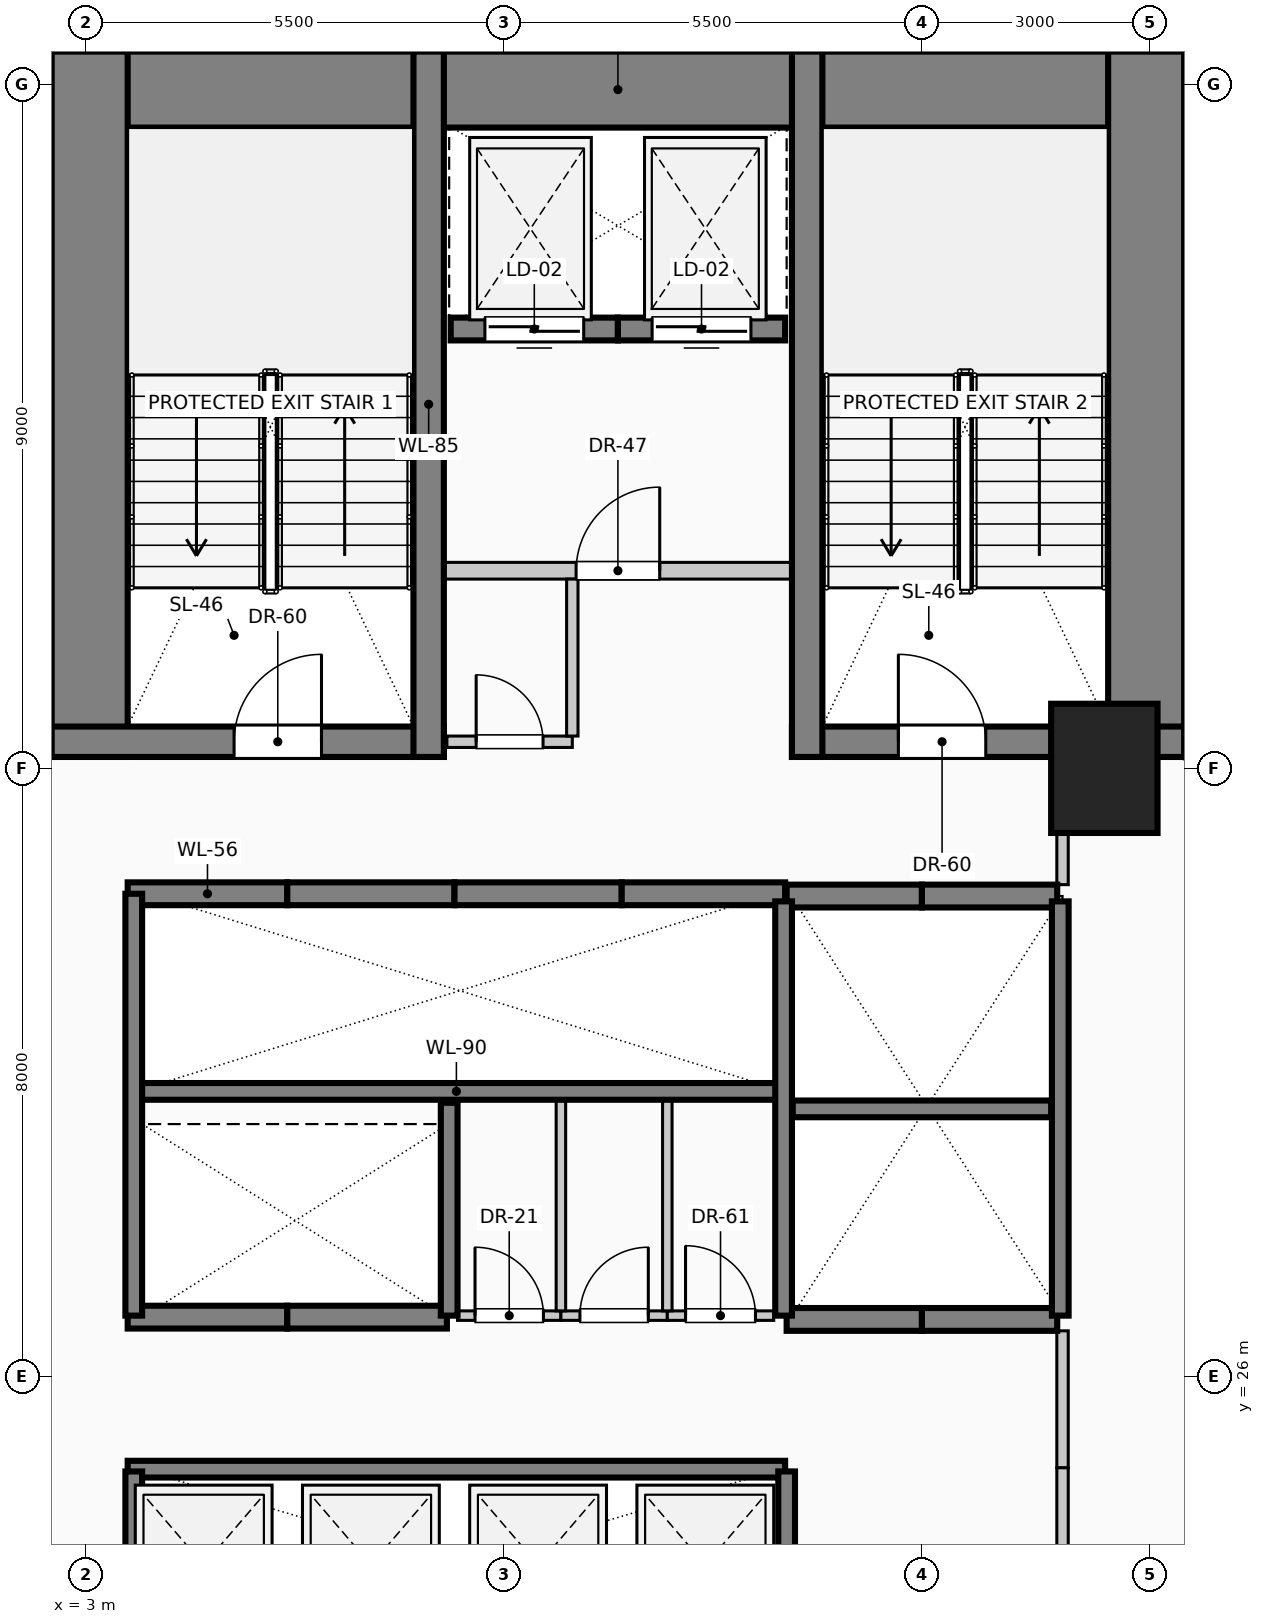
"""IFC4 building model, lengths in metres.
Left out: names, types, materials, properties, quantities, classifications, styles, units other than length and angle.
Written with IfcOpenShell. Run it as: python <this file> out.ifc"""

import sys

from ifc_helpers import new_model, si_unit, direction, frame, frame_2d, origin, origin_2d, place, context, subcontext, project, spatial, rectangle, extrude, element, fill, save


model = new_model("IFC4")
c1 = context("Model", 3, precision=1e-05, world=origin(), true_north=direction((0.0, 1.0)))
c2 = subcontext(c1, "Body", "Model", "MODEL_VIEW")
j1 = project(units=[si_unit("LENGTHUNIT", "METRE"), si_unit("PLANEANGLEUNIT", "RADIAN")], contexts=[c1])
p1 = place(None, origin())
s1 = spatial("IfcSite", under=j1, at=p1, CompositionType="ELEMENT")
p2 = place(p1, origin())
s2 = spatial("IfcBuilding", under=s1, at=p2, CompositionType="ELEMENT")
p3 = place(p2, frame((0.0, 0.0, 13.5)))
s3 = spatial("IfcBuildingStorey", under=s2, at=p3, CompositionType="ELEMENT", Elevation=13.5)
p4 = place(p3, frame((2.55, 42.93, 0.0), z_axis=(0.0, 0.0, 1.0), x_axis=(1.0, 0.0, 0.0)))
e1 = element("IfcWall", 1, at=p4, inside=s3, PredefinedType="SHEAR", context=c2, shape_type="SweptSolid", body=[
    extrude(rectangle(XDim=14.9, YDim=1.0, at=frame_2d((7.45, 0.0))), origin(), (0.0, 0.0, 1.0), 4.05),
])
for number, where, z_axis, x_axis in (
    (2, (3.05, 34.15, 0.0), (0.0, 0.0, 1.0), (0.0, 1.0, 0.0)),
    (3, (16.95, 34.15, 0.0), (0.0, 0.0, 1.0), (0.0, 1.0, 0.0)),
):
    element("IfcWall", number, at=place(p3, frame(where, z_axis=z_axis, x_axis=x_axis)), inside=s3, PredefinedType="SHEAR", context=c2, shape_type="SweptSolid", body=[
        extrude(rectangle(XDim=9.28, YDim=1.0, at=frame_2d((4.64, 0.0))), origin(), (0.0, 0.0, 1.0), 4.05),
    ])
p5 = place(p3, frame((2.55, 34.35, 0.0), z_axis=(0.0, 0.0, 1.0), x_axis=(1.0, 0.0, 0.0)))
e4 = element("IfcWall", 4, at=p5, inside=s3, PredefinedType="SHEAR", context=c2, shape_type="SweptSolid", body=[
    extrude(rectangle(XDim=5.16, YDim=0.4, at=frame_2d((2.58, 0.0))), origin(), (0.0, 0.0, 1.0), 4.05),
])
p6 = place(p5, frame((2.4, 0.0, 0.0)))
e5 = element("IfcOpeningElement", 5, at=p6, cuts=e4, PredefinedType="OPENING", context=c2, shape_type="SweptSolid", body=[
    extrude(rectangle(XDim=1.15, YDim=2.2, at=frame_2d((0.575, 1.1))), frame((0.0, 0.21, 0.0), z_axis=(0.0, -1.0, 0.0), x_axis=(1.0, 0.0, 0.0)), (0.0, 0.0, 1.0), 0.42),
])
p7 = place(p3, frame((12.29, 34.35, 0.0), z_axis=(0.0, 0.0, 1.0), x_axis=(1.0, 0.0, 0.0)))
e6 = element("IfcWall", 6, at=p7, inside=s3, PredefinedType="SHEAR", context=c2, shape_type="SweptSolid", body=[
    extrude(rectangle(XDim=5.16, YDim=0.4, at=frame_2d((2.58, 0.0))), origin(), (0.0, 0.0, 1.0), 4.05),
])
p8 = place(p7, frame((1.4, 0.0, 0.0)))
e7 = element("IfcOpeningElement", 7, at=p8, cuts=e6, PredefinedType="OPENING", context=c2, shape_type="SweptSolid", body=[
    extrude(rectangle(XDim=1.15, YDim=2.2, at=frame_2d((0.575, 1.1))), frame((0.0, 0.21, 0.0), z_axis=(0.0, -1.0, 0.0), x_axis=(1.0, 0.0, 0.0)), (0.0, 0.0, 1.0), 0.42),
])
for number, where, z_axis, x_axis in (
    (8, (7.51, 34.15, 0.0), (0.0, 0.0, 1.0), (0.0, 1.0, 0.0)),
    (9, (12.49, 34.15, 0.0), (0.0, 0.0, 1.0), (0.0, 1.0, 0.0)),
):
    element("IfcWall", number, at=place(p3, frame(where, z_axis=z_axis, x_axis=x_axis)), inside=s3, PredefinedType="SHEAR", context=c2, shape_type="SweptSolid", body=[
        extrude(rectangle(XDim=9.28, YDim=0.4, at=frame_2d((4.64, 0.0))), origin(), (0.0, 0.0, 1.0), 4.05),
    ])
p9 = place(p3, frame((16.4, 34.0, 0.0), z_axis=(0.0, 0.0, 1.0), x_axis=(1.0, 0.0, 0.0)))
e10 = element("IfcColumn", 10, at=p9, inside=s3, PredefinedType="COLUMN", context=c2, shape_type="SweptSolid", body=[
    extrude(rectangle(XDim=1.4, YDim=1.7, at=origin_2d()), origin(), (0.0, 0.0, 1.0), 4.05),
])
for number, where, z_axis, x_axis in (
    (11, (14.0, 26.75, 0.0), (0.0, 0.0, 1.0), (-1.0, 0.0, 0.0)),
    (12, (15.78, 26.75, 0.0), (0.0, 0.0, 1.0), (-1.0, 0.0, 0.0)),
    (13, (12.22, 32.32, 0.0), (0.0, 0.0, 1.0), (1.0, 0.0, 0.0)),
    (14, (14.0, 32.32, 0.0), (0.0, 0.0, 1.0), (1.0, 0.0, 0.0)),
):
    element("IfcWall", number, at=place(p3, frame(where, z_axis=z_axis, x_axis=x_axis)), inside=s3, PredefinedType="SOLIDWALL", context=c2, shape_type="SweptSolid", body=[
        extrude(rectangle(XDim=1.78, YDim=0.3, at=frame_2d((0.89, 0.0))), origin(), (0.0, 0.0, 1.0), 4.05),
    ])
p10 = place(p3, frame((3.55, 32.35, 0.0), z_axis=(0.0, 0.0, 1.0), x_axis=(1.0, 0.0, 0.0)))
e15 = element("IfcWall", 15, at=p10, inside=s3, PredefinedType="SOLIDWALL", context=c2, shape_type="SweptSolid", body=[
    extrude(rectangle(XDim=2.1, YDim=0.3, at=frame_2d((1.05, 0.0))), origin(), (0.0, 0.0, 1.0), 4.05),
])
p11 = place(p3, frame((5.65, 32.35, 0.0), z_axis=(0.0, 0.0, 1.0), x_axis=(1.0, 0.0, 0.0)))
e16 = element("IfcWall", 16, at=p11, inside=s3, PredefinedType="SOLIDWALL", context=c2, shape_type="SweptSolid", body=[
    extrude(rectangle(XDim=2.2, YDim=0.3, at=frame_2d((1.1, 0.0))), origin(), (0.0, 0.0, 1.0), 4.05),
])
p12 = place(p3, frame((7.85, 32.35, 0.0), z_axis=(0.0, 0.0, 1.0), x_axis=(1.0, 0.0, 0.0)))
e17 = element("IfcWall", 17, at=p12, inside=s3, PredefinedType="SOLIDWALL", context=c2, shape_type="SweptSolid", body=[
    extrude(rectangle(XDim=2.2, YDim=0.3, at=frame_2d((1.1, 0.0))), origin(), (0.0, 0.0, 1.0), 4.05),
])
p13 = place(p3, frame((10.05, 32.35, 0.0), z_axis=(0.0, 0.0, 1.0), x_axis=(1.0, 0.0, 0.0)))
e18 = element("IfcWall", 18, at=p13, inside=s3, PredefinedType="SOLIDWALL", context=c2, shape_type="SweptSolid", body=[
    extrude(rectangle(XDim=2.15, YDim=0.3, at=frame_2d((1.075, 0.0))), origin(), (0.0, 0.0, 1.0), 4.05),
])
p14 = place(p3, frame((5.65, 26.78, 0.0), z_axis=(0.0, 0.0, 1.0), x_axis=(-1.0, 0.0, 0.0)))
e19 = element("IfcWall", 19, at=p14, inside=s3, PredefinedType="SOLIDWALL", context=c2, shape_type="SweptSolid", body=[
    extrude(rectangle(XDim=2.1, YDim=0.3, at=frame_2d((1.05, 0.0))), origin(), (0.0, 0.0, 1.0), 4.05),
])
p15 = place(p3, frame((7.75, 26.78, 0.0), z_axis=(0.0, 0.0, 1.0), x_axis=(-1.0, 0.0, 0.0)))
e20 = element("IfcWall", 20, at=p15, inside=s3, PredefinedType="SOLIDWALL", context=c2, shape_type="SweptSolid", body=[
    extrude(rectangle(XDim=2.1, YDim=0.3, at=frame_2d((1.05, 0.0))), origin(), (0.0, 0.0, 1.0), 4.05),
])
p16 = place(p3, frame((10.0, 39.78, 0.0), z_axis=(0.0, 0.0, 1.0), x_axis=(-1.0, 0.0, 0.0)))
e21 = element("IfcWall", 21, at=p16, inside=s3, PredefinedType="SOLIDWALL", context=c2, shape_type="SweptSolid", body=[
    extrude(rectangle(XDim=2.2, YDim=0.3, at=frame_2d((1.1, 0.0))), origin(), (0.0, 0.0, 1.0), 4.05),
])
p17 = place(p16, frame((0.45, 0.0, 0.0)))
e22 = element("IfcOpeningElement", 22, at=p17, cuts=e21, PredefinedType="OPENING", context=c2, shape_type="SweptSolid", body=[
    extrude(rectangle(XDim=1.3, YDim=2.25, at=frame_2d((0.65, 1.125))), frame((0.0, 0.16, 0.0), z_axis=(0.0, -1.0, 0.0), x_axis=(1.0, 0.0, 0.0)), (0.0, 0.0, 1.0), 0.32),
])
p18 = place(p3, frame((12.2, 39.78, 0.0), z_axis=(0.0, 0.0, 1.0), x_axis=(-1.0, 0.0, 0.0)))
e23 = element("IfcWall", 23, at=p18, inside=s3, PredefinedType="SOLIDWALL", context=c2, shape_type="SweptSolid", body=[
    extrude(rectangle(XDim=2.2, YDim=0.3, at=frame_2d((1.1, 0.0))), origin(), (0.0, 0.0, 1.0), 4.05),
])
p19 = place(p18, frame((0.45, 0.0, 0.0)))
e24 = element("IfcOpeningElement", 24, at=p19, cuts=e23, PredefinedType="OPENING", context=c2, shape_type="SweptSolid", body=[
    extrude(rectangle(XDim=1.3, YDim=2.25, at=frame_2d((0.65, 1.125))), frame((0.0, 0.16, 0.0), z_axis=(0.0, -1.0, 0.0), x_axis=(1.0, 0.0, 0.0)), (0.0, 0.0, 1.0), 0.32),
])
p20 = place(p3, frame((3.55, 29.75, 0.0), z_axis=(0.0, 0.0, 1.0), x_axis=(1.0, 0.0, 0.0)))
e25 = element("IfcWall", 25, at=p20, inside=s3, PredefinedType="SOLIDWALL", context=c2, shape_type="SweptSolid", body=[
    extrude(rectangle(XDim=8.65, YDim=0.22, at=frame_2d((4.325, 0.0))), origin(), (0.0, 0.0, 1.0), 4.05),
])
p21 = place(p3, frame((3.63, 26.8, 0.0), z_axis=(0.0, 0.0, 1.0), x_axis=(0.0, 1.0, 0.0)))
e26 = element("IfcWall", 26, at=p21, inside=s3, PredefinedType="SOLIDWALL", context=c2, shape_type="SweptSolid", body=[
    extrude(rectangle(XDim=5.55, YDim=0.22, at=frame_2d((2.775, 0.0))), origin(), (0.0, 0.0, 1.0), 4.05),
])
p22 = place(p3, frame((7.78, 26.8, 0.0), z_axis=(0.0, 0.0, 1.0), x_axis=(0.0, 1.0, 0.0)))
e27 = element("IfcWall", 27, at=p22, inside=s3, PredefinedType="SOLIDWALL", context=c2, shape_type="SweptSolid", body=[
    extrude(rectangle(XDim=2.8, YDim=0.22, at=frame_2d((1.4, 0.0))), origin(), (0.0, 0.0, 1.0), 4.05),
])
for number, where, z_axis, x_axis in (
    (28, (12.18, 26.8, 0.0), (0.0, 0.0, 1.0), (0.0, 1.0, 0.0)),
    (29, (15.82, 26.8, 0.0), (0.0, 0.0, 1.0), (0.0, 1.0, 0.0)),
):
    element("IfcWall", number, at=place(p3, frame(where, z_axis=z_axis, x_axis=x_axis)), inside=s3, PredefinedType="SOLIDWALL", context=c2, shape_type="SweptSolid", body=[
        extrude(rectangle(XDim=5.45, YDim=0.22, at=frame_2d((2.725, 0.0))), origin(), (0.0, 0.0, 1.0), 4.05),
    ])
p23 = place(p3, frame((12.3, 29.52, 0.0), z_axis=(0.0, 0.0, 1.0), x_axis=(1.0, 0.0, 0.0)))
e30 = element("IfcWall", 30, at=p23, inside=s3, PredefinedType="SOLIDWALL", context=c2, shape_type="SweptSolid", body=[
    extrude(rectangle(XDim=3.4, YDim=0.22, at=frame_2d((1.7, 0.0))), origin(), (0.0, 0.0, 1.0), 4.05),
])
p24 = place(p3, frame((3.55, 24.78, 0.0), z_axis=(0.0, 0.0, 1.0), x_axis=(1.0, 0.0, 0.0)))
e31 = element("IfcWall", 31, at=p24, inside=s3, PredefinedType="SOLIDWALL", context=c2, shape_type="SweptSolid", body=[
    extrude(rectangle(XDim=8.65, YDim=0.22, at=frame_2d((4.325, 0.0))), origin(), (0.0, 0.0, 1.0), 4.05),
])
for number, where, z_axis, x_axis in (
    (32, (3.63, 22.3, 0.0), (0.0, 0.0, 1.0), (0.0, 1.0, 0.0)),
    (33, (12.22, 22.3, 0.0), (0.0, 0.0, 1.0), (0.0, 1.0, 0.0)),
):
    element("IfcWall", number, at=place(p3, frame(where, z_axis=z_axis, x_axis=x_axis)), inside=s3, PredefinedType="SOLIDWALL", context=c2, shape_type="SweptSolid", body=[
        extrude(rectangle(XDim=2.45, YDim=0.22, at=frame_2d((1.225, 0.0))), origin(), (0.0, 0.0, 1.0), 4.05),
    ])
p25 = place(p3, frame((7.51, 36.6, 0.0), z_axis=(0.0, 0.0, 1.0), x_axis=(1.0, 0.0, 0.0)))
e34 = element("IfcWall", 34, at=p25, inside=s3, PredefinedType="PARTITIONING", context=c2, shape_type="SweptSolid", body=[
    extrude(rectangle(XDim=4.98, YDim=0.22, at=frame_2d((2.49, 0.0))), origin(), (0.0, 0.0, 1.0), 3.65),
])
p26 = place(p25, frame((1.94, 0.0, 0.0)))
e35 = element("IfcOpeningElement", 35, at=p26, cuts=e34, PredefinedType="OPENING", context=c2, shape_type="SweptSolid", body=[
    extrude(rectangle(XDim=1.1, YDim=2.2, at=frame_2d((0.55, 1.1))), frame((0.0, 0.12, 0.0), z_axis=(0.0, -1.0, 0.0), x_axis=(1.0, 0.0, 0.0)), (0.0, 0.0, 1.0), 0.24),
])
p27 = place(p3, frame((7.89, 26.8, 0.0), z_axis=(0.0, 0.0, 1.0), x_axis=(1.0, 0.0, 0.0)))
e36 = element("IfcWall", 36, at=p27, inside=s3, PredefinedType="PARTITIONING", context=c2, shape_type="SweptSolid", body=[
    extrude(rectangle(XDim=1.36, YDim=0.125, at=frame_2d((0.68, 0.0))), origin(), (0.0, 0.0, 1.0), 3.65),
])
p28 = place(p27, frame((0.23, 0.0, 0.0)))
e37 = element("IfcOpeningElement", 37, at=p28, cuts=e36, PredefinedType="OPENING", context=c2, shape_type="SweptSolid", body=[
    extrude(rectangle(XDim=0.9, YDim=2.1, at=frame_2d((0.45, 1.05))), frame((0.0, 0.073, 0.0), z_axis=(0.0, -1.0, 0.0), x_axis=(1.0, 0.0, 0.0)), (0.0, 0.0, 1.0), 0.145),
])
p29 = place(p3, frame((9.25, 26.8, 0.0), z_axis=(0.0, 0.0, 1.0), x_axis=(1.0, 0.0, 0.0)))
e38 = element("IfcWall", 38, at=p29, inside=s3, PredefinedType="PARTITIONING", context=c2, shape_type="SweptSolid", body=[
    extrude(rectangle(XDim=1.4, YDim=0.125, at=frame_2d((0.7, 0.0))), origin(), (0.0, 0.0, 1.0), 3.65),
])
p30 = place(p29, frame((0.25, 0.0, 0.0)))
e39 = element("IfcOpeningElement", 39, at=p30, cuts=e38, PredefinedType="OPENING", context=c2, shape_type="SweptSolid", body=[
    extrude(rectangle(XDim=0.9, YDim=2.1, at=frame_2d((0.45, 1.05))), frame((0.0, 0.073, 0.0), z_axis=(0.0, -1.0, 0.0), x_axis=(1.0, 0.0, 0.0)), (0.0, 0.0, 1.0), 0.145),
])
p31 = place(p3, frame((10.65, 26.8, 0.0), z_axis=(0.0, 0.0, 1.0), x_axis=(1.0, 0.0, 0.0)))
e40 = element("IfcWall", 40, at=p31, inside=s3, PredefinedType="PARTITIONING", context=c2, shape_type="SweptSolid", body=[
    extrude(rectangle(XDim=1.4, YDim=0.125, at=frame_2d((0.7, 0.0))), origin(), (0.0, 0.0, 1.0), 3.65),
])
p32 = place(p31, frame((0.24, 0.0, 0.0)))
e41 = element("IfcOpeningElement", 41, at=p32, cuts=e40, PredefinedType="OPENING", context=c2, shape_type="SweptSolid", body=[
    extrude(rectangle(XDim=0.92, YDim=2.1, at=frame_2d((0.46, 1.05))), frame((0.0, 0.073, 0.0), z_axis=(0.0, -1.0, 0.0), x_axis=(1.0, 0.0, 0.0)), (0.0, 0.0, 1.0), 0.145),
])
p33 = place(p3, frame((7.75, 34.35, 0.0), z_axis=(0.0, 0.0, 1.0), x_axis=(1.0, 0.0, 0.0)))
e42 = element("IfcWall", 42, at=p33, inside=s3, PredefinedType="PARTITIONING", context=c2, shape_type="SweptSolid", body=[
    extrude(rectangle(XDim=1.65, YDim=0.15, at=frame_2d((0.825, 0.0))), origin(), (0.0, 0.0, 1.0), 2.695),
])
p34 = place(p33, frame((0.385, 0.0, 0.0)))
e43 = element("IfcOpeningElement", 43, at=p34, cuts=e42, PredefinedType="OPENING", context=c2, shape_type="SweptSolid", body=[
    extrude(rectangle(XDim=0.88, YDim=2.1, at=frame_2d((0.44, 1.05))), frame((0.0, 0.085, 0.0), z_axis=(0.0, -1.0, 0.0), x_axis=(1.0, 0.0, 0.0)), (0.0, 0.0, 1.0), 0.17),
])
p35 = place(p3, frame((9.25, 26.863, 0.0), z_axis=(0.0, 0.0, 1.0), x_axis=(0.0, 1.0, 0.0)))
e44 = element("IfcWall", 44, at=p35, inside=s3, PredefinedType="PARTITIONING", context=c2, shape_type="SweptSolid", body=[
    extrude(rectangle(XDim=2.777, YDim=0.125, at=frame_2d((1.389, 0.0))), origin(), (0.0, 0.0, 1.0), 3.65),
])
p36 = place(p3, frame((9.4, 34.425, 0.0), z_axis=(0.0, 0.0, 1.0), x_axis=(0.0, 1.0, 0.0)))
e45 = element("IfcWall", 45, at=p36, inside=s3, PredefinedType="PARTITIONING", context=c2, shape_type="SweptSolid", body=[
    extrude(rectangle(XDim=2.065, YDim=0.15, at=frame_2d((1.032, 0.0))), origin(), (0.0, 0.0, 1.0), 3.65),
])
p37 = place(p3, frame((10.65, 26.863, 0.0), z_axis=(0.0, 0.0, 1.0), x_axis=(0.0, 1.0, 0.0)))
e46 = element("IfcWall", 46, at=p37, inside=s3, PredefinedType="PARTITIONING", context=c2, shape_type="SweptSolid", body=[
    extrude(rectangle(XDim=2.777, YDim=0.125, at=frame_2d((1.389, 0.0))), origin(), (0.0, 0.0, 1.0), 3.65),
])
p38 = place(p3, frame((15.85, 20.29, 0.0), z_axis=(0.0, 0.0, 1.0), x_axis=(0.0, 1.0, 0.0)))
e47 = element("IfcWall", 47, at=p38, inside=s3, PredefinedType="PARTITIONING", context=c2, shape_type="SweptSolid", body=[
    extrude(rectangle(XDim=4.51, YDim=0.15, at=frame_2d((2.255, 0.0))), origin(), (0.0, 0.0, 1.0), 3.65),
])
p39 = place(p3, frame((15.85, 24.8, 0.0), z_axis=(0.0, 0.0, 1.0), x_axis=(0.0, 1.0, 0.0)))
e48 = element("IfcWall", 48, at=p39, inside=s3, PredefinedType="PARTITIONING", context=c2, shape_type="SweptSolid", body=[
    extrude(rectangle(XDim=1.8, YDim=0.15, at=frame_2d((0.9, 0.0))), origin(), (0.0, 0.0, 1.0), 3.65),
])
p40 = place(p3, frame((15.85, 32.47, 0.0), z_axis=(0.0, 0.0, 1.0), x_axis=(0.0, 1.0, 0.0)))
e49 = element("IfcWall", 49, at=p40, inside=s3, PredefinedType="PARTITIONING", context=c2, shape_type="SweptSolid", body=[
    extrude(rectangle(XDim=0.68, YDim=0.15, at=frame_2d((0.34, 0.0))), origin(), (0.0, 0.0, 1.0), 3.65),
])
p41 = place(p17, origin())
e50 = element("IfcDoor", 50, at=p41, inside=s3, OperationType="SLIDING_TO_LEFT", PredefinedType="DOOR", context=c2, shape_type="SweptSolid", body=[
    extrude(rectangle(XDim=1.3, YDim=2.25, at=frame_2d((0.65, 1.125))), frame((0.0, 0.025, 0.0), z_axis=(0.0, -1.0, 0.0), x_axis=(1.0, 0.0, 0.0)), (0.0, 0.0, 1.0), 0.05),
])
fill(e22, e50)
p42 = place(p19, origin())
e51 = element("IfcDoor", 51, at=p42, inside=s3, OperationType="SLIDING_TO_RIGHT", PredefinedType="DOOR", context=c2, shape_type="SweptSolid", body=[
    extrude(rectangle(XDim=1.3, YDim=2.25, at=frame_2d((0.65, 1.125))), frame((0.0, 0.025, 0.0), z_axis=(0.0, -1.0, 0.0), x_axis=(1.0, 0.0, 0.0)), (0.0, 0.0, 1.0), 0.05),
])
fill(e24, e51)
p43 = place(p6, origin())
e52 = element("IfcDoor", 52, at=p43, inside=s3, OperationType="SINGLE_SWING_RIGHT", PredefinedType="DOOR", context=c2, shape_type="SweptSolid", body=[
    extrude(rectangle(XDim=1.15, YDim=2.2, at=frame_2d((0.575, 1.1))), frame((0.0, 0.025, 0.0), z_axis=(0.0, -1.0, 0.0), x_axis=(1.0, 0.0, 0.0)), (0.0, 0.0, 1.0), 0.05),
])
fill(e5, e52)
p44 = place(p8, origin())
e53 = element("IfcDoor", 53, at=p44, inside=s3, OperationType="SINGLE_SWING_LEFT", PredefinedType="DOOR", context=c2, shape_type="SweptSolid", body=[
    extrude(rectangle(XDim=1.15, YDim=2.2, at=frame_2d((0.575, 1.1))), frame((0.0, 0.025, 0.0), z_axis=(0.0, -1.0, 0.0), x_axis=(1.0, 0.0, 0.0)), (0.0, 0.0, 1.0), 0.05),
])
fill(e7, e53)
p45 = place(p26, origin())
e54 = element("IfcDoor", 54, at=p45, inside=s3, OperationType="SINGLE_SWING_RIGHT", PredefinedType="DOOR", context=c2, shape_type="SweptSolid", body=[
    extrude(rectangle(XDim=1.1, YDim=2.2, at=frame_2d((0.55, 1.1))), frame((0.0, 0.025, 0.0), z_axis=(0.0, -1.0, 0.0), x_axis=(1.0, 0.0, 0.0)), (0.0, 0.0, 1.0), 0.05),
])
fill(e35, e54)
p46 = place(p28, origin())
e55 = element("IfcDoor", 55, at=p46, inside=s3, OperationType="SINGLE_SWING_LEFT", PredefinedType="DOOR", context=c2, shape_type="SweptSolid", body=[
    extrude(rectangle(XDim=0.9, YDim=2.1, at=frame_2d((0.45, 1.05))), frame((0.0, 0.025, 0.0), z_axis=(0.0, -1.0, 0.0), x_axis=(1.0, 0.0, 0.0)), (0.0, 0.0, 1.0), 0.05),
])
fill(e37, e55)
p47 = place(p30, origin())
e56 = element("IfcDoor", 56, at=p47, inside=s3, OperationType="SINGLE_SWING_RIGHT", PredefinedType="DOOR", context=c2, shape_type="SweptSolid", body=[
    extrude(rectangle(XDim=0.9, YDim=2.1, at=frame_2d((0.45, 1.05))), frame((0.0, 0.025, 0.0), z_axis=(0.0, -1.0, 0.0), x_axis=(1.0, 0.0, 0.0)), (0.0, 0.0, 1.0), 0.05),
])
fill(e39, e56)
p48 = place(p32, origin())
e57 = element("IfcDoor", 57, at=p48, inside=s3, OperationType="SINGLE_SWING_LEFT", PredefinedType="DOOR", context=c2, shape_type="SweptSolid", body=[
    extrude(rectangle(XDim=0.92, YDim=2.1, at=frame_2d((0.46, 1.05))), frame((0.0, 0.025, 0.0), z_axis=(0.0, -1.0, 0.0), x_axis=(1.0, 0.0, 0.0)), (0.0, 0.0, 1.0), 0.05),
])
fill(e41, e57)
p49 = place(p34, origin())
e58 = element("IfcDoor", 58, at=p49, inside=s3, OperationType="SINGLE_SWING_LEFT", PredefinedType="DOOR", context=c2, shape_type="SweptSolid", body=[
    extrude(rectangle(XDim=0.88, YDim=2.1, at=frame_2d((0.44, 1.05))), frame((0.0, 0.025, 0.0), z_axis=(0.0, -1.0, 0.0), x_axis=(1.0, 0.0, 0.0)), (0.0, 0.0, 1.0), 0.05),
])
fill(e43, e58)
save(model, sys.argv[1])
